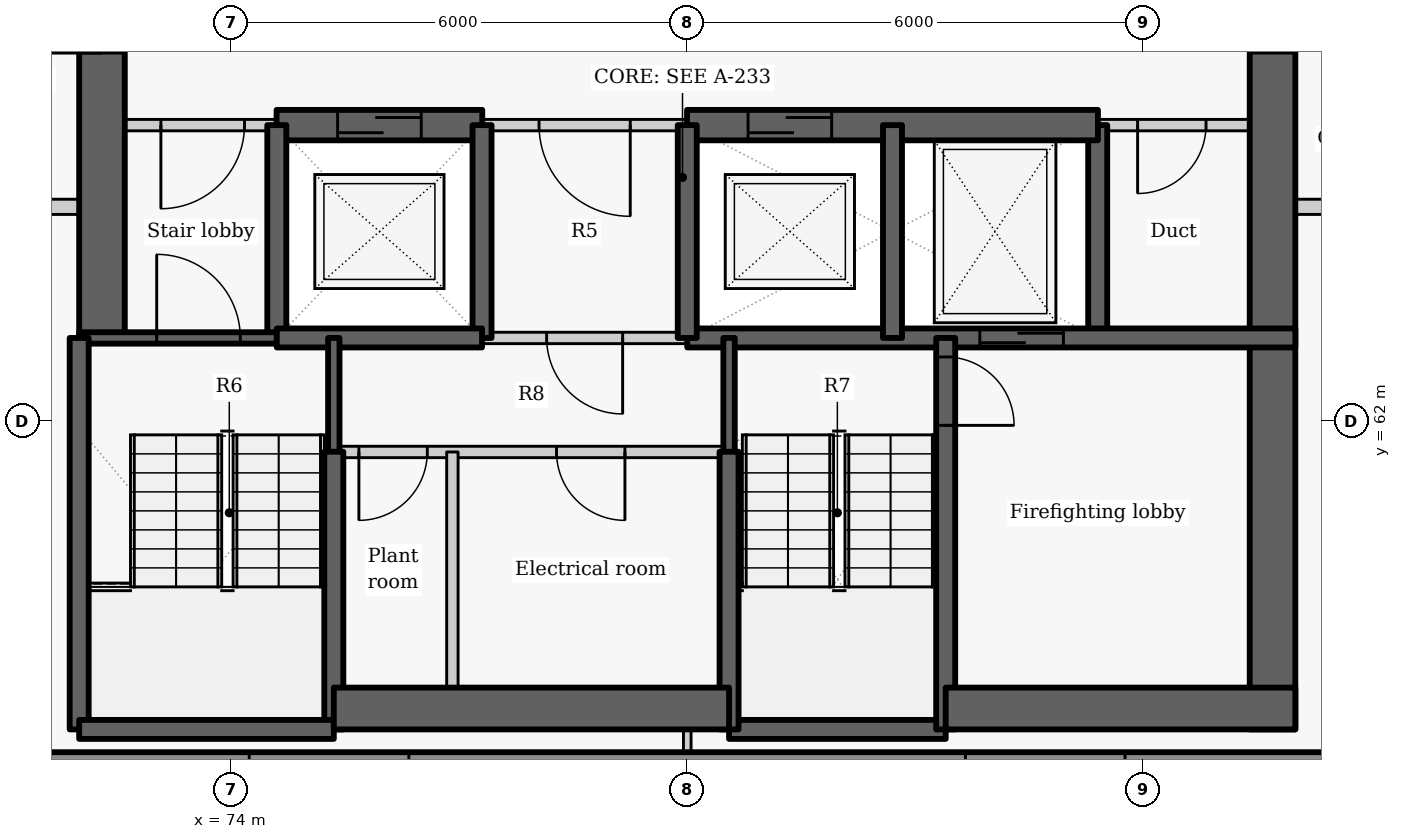
"""IFC4 building model, lengths in metres.
Left out: names, types, materials, properties, quantities, classifications, styles, units other than length and angle.
Written with IfcOpenShell. Run it as: python <this file> out.ifc"""

import sys

from ifc_helpers import new_model, si_unit, direction, frame, frame_2d, origin, place, context, subcontext, project, spatial, rectangle, extrude, element, fill, save


model = new_model("IFC4")
c1 = context("Model", 3, precision=1e-05, world=origin(), true_north=direction((0.0, 1.0)))
c2 = subcontext(c1, "Body", "Model", "MODEL_VIEW")
j1 = project(units=[si_unit("LENGTHUNIT", "METRE"), si_unit("PLANEANGLEUNIT", "RADIAN")], contexts=[c1])
p1 = place(None, origin())
s1 = spatial("IfcSite", under=j1, at=p1, CompositionType="ELEMENT")
p2 = place(p1, origin())
s2 = spatial("IfcBuilding", under=s1, at=p2, CompositionType="ELEMENT")
p3 = place(p2, frame((0.0, 0.0, 183.3)))
s3 = spatial("IfcBuildingStorey", under=s2, at=p3, CompositionType="ELEMENT", Elevation=183.3)
p4 = place(p3, frame((70.551, 57.5, 0.0), z_axis=(0.0, 0.0, 1.0), x_axis=(1.0, 0.0, 0.0)))
e1 = element("IfcWall", 1, at=p4, inside=s3, PredefinedType="SOLIDWALL", context=c2, shape_type="SweptSolid", body=[
    extrude(rectangle(XDim=18.893, YDim=0.3, at=frame_2d((9.446, 0.0))), origin(), (0.0, 0.0, 1.0), 2.425),
])
p5 = place(p4, frame((3.687, 0.0, 0.9)))
e2 = element("IfcOpeningElement", 2, at=p5, cuts=e1, PredefinedType="OPENING", context=c2, shape_type="SweptSolid", body=[
    extrude(rectangle(XDim=2.1, YDim=1.1, at=frame_2d((1.05, 0.55))), frame((0.0, 0.16, 0.0), z_axis=(0.0, -1.0, 0.0), x_axis=(1.0, 0.0, 0.0)), (0.0, 0.0, 1.0), 0.32),
])
p6 = place(p4, frame((13.109, 0.0, 0.9)))
e3 = element("IfcOpeningElement", 3, at=p6, cuts=e1, PredefinedType="OPENING", context=c2, shape_type="SweptSolid", body=[
    extrude(rectangle(XDim=2.1, YDim=1.1, at=frame_2d((1.05, 0.55))), frame((0.0, 0.16, 0.0), z_axis=(0.0, -1.0, 0.0), x_axis=(1.0, 0.0, 0.0)), (0.0, 0.0, 1.0), 0.32),
])
p7 = place(p3, frame((72.3, 63.1, -0.275), z_axis=(0.0, 0.0, 1.0), x_axis=(0.0, 1.0, 0.0)))
e4 = element("IfcWall", 4, at=p7, inside=s3, PredefinedType="SHEAR", context=c2, shape_type="SweptSolid", body=[
    extrude(rectangle(XDim=9.1, YDim=0.6, at=frame_2d((4.55, 0.0))), origin(), (0.0, 0.0, 1.0), 3.3),
])
p8 = place(p7, frame((3.748, 0.0, 0.275)))
e5 = element("IfcOpeningElement", 5, at=p8, cuts=e4, PredefinedType="OPENING", context=c2, shape_type="SweptSolid", body=[
    extrude(rectangle(XDim=1.5, YDim=2.1, at=frame_2d((0.75, 1.05))), frame((0.0, 0.31, 0.0), z_axis=(0.0, -1.0, 0.0), x_axis=(1.0, 0.0, 0.0)), (0.0, 0.0, 1.0), 0.62),
])
p9 = place(p3, frame((85.4, 63.1, -0.275), z_axis=(0.0, 0.0, 1.0), x_axis=(0.0, 1.0, 0.0)))
e6 = element("IfcWall", 6, at=p9, inside=s3, PredefinedType="SHEAR", context=c2, shape_type="SweptSolid", body=[
    extrude(rectangle(XDim=2.8, YDim=0.25, at=frame_2d((1.4, 0.0))), origin(), (0.0, 0.0, 1.0), 3.3),
])
p10 = place(p3, frame((87.7, 72.2, -0.275), z_axis=(0.0, 0.0, 1.0), x_axis=(0.0, -1.0, 0.0)))
e7 = element("IfcWall", 7, at=p10, inside=s3, PredefinedType="SHEAR", context=c2, shape_type="SweptSolid", body=[
    extrude(rectangle(XDim=14.25, YDim=0.6, at=frame_2d((7.125, 0.0))), origin(), (0.0, 0.0, 1.0), 3.3),
])
p11 = place(p10, frame((3.852, 0.0, 0.275)))
e8 = element("IfcOpeningElement", 8, at=p11, cuts=e7, PredefinedType="OPENING", context=c2, shape_type="SweptSolid", body=[
    extrude(rectangle(XDim=1.5, YDim=2.1, at=frame_2d((0.75, 1.05))), frame((0.0, 0.31, 0.0), z_axis=(0.0, -1.0, 0.0), x_axis=(1.0, 0.0, 0.0)), (0.0, 0.0, 1.0), 0.62),
])
p12 = place(p3, frame((74.603, 65.9, 0.0), z_axis=(0.0, 0.0, 1.0), x_axis=(-1.0, 0.0, 0.0)))
e9 = element("IfcWall", 9, at=p12, inside=s3, PredefinedType="PARTITIONING", context=c2, shape_type="SweptSolid", body=[
    extrude(rectangle(XDim=2.603, YDim=0.15, at=frame_2d((1.302, 0.0))), origin(), (0.0, 0.0, 1.0), 3.025),
])
p13 = place(p12, frame((0.428, 0.0, 0.0)))
e10 = element("IfcOpeningElement", 10, at=p13, cuts=e9, PredefinedType="OPENING", context=c2, shape_type="SweptSolid", body=[
    extrude(rectangle(XDim=1.1, YDim=2.1, at=frame_2d((0.55, 1.05))), frame((0.0, 0.085, 0.0), z_axis=(0.0, -1.0, 0.0), x_axis=(1.0, 0.0, 0.0)), (0.0, 0.0, 1.0), 0.17),
])
p14 = place(p3, frame((80.003, 65.9, 0.0), z_axis=(0.0, 0.0, 1.0), x_axis=(-1.0, 0.0, 0.0)))
e11 = element("IfcWall", 11, at=p14, inside=s3, PredefinedType="PARTITIONING", context=c2, shape_type="SweptSolid", body=[
    extrude(rectangle(XDim=2.706, YDim=0.15, at=frame_2d((1.353, 0.0))), origin(), (0.0, 0.0, 1.0), 3.025),
])
p15 = place(p14, frame((0.753, 0.0, 0.0)))
e12 = element("IfcOpeningElement", 12, at=p15, cuts=e11, PredefinedType="OPENING", context=c2, shape_type="SweptSolid", body=[
    extrude(rectangle(XDim=1.2, YDim=2.1, at=frame_2d((0.6, 1.05))), frame((0.0, 0.085, 0.0), z_axis=(0.0, -1.0, 0.0), x_axis=(1.0, 0.0, 0.0)), (0.0, 0.0, 1.0), 0.17),
])
p16 = place(p3, frame((88.0, 65.9, 0.0), z_axis=(0.0, 0.0, 1.0), x_axis=(-1.0, 0.0, 0.0)))
e13 = element("IfcWall", 13, at=p16, inside=s3, PredefinedType="PARTITIONING", context=c2, shape_type="SweptSolid", body=[
    extrude(rectangle(XDim=2.603, YDim=0.15, at=frame_2d((1.302, 0.0))), origin(), (0.0, 0.0, 1.0), 3.025),
])
p17 = place(p16, frame((1.175, 0.0, 0.0)))
e14 = element("IfcOpeningElement", 14, at=p17, cuts=e13, PredefinedType="OPENING", context=c2, shape_type="SweptSolid", body=[
    extrude(rectangle(XDim=0.9, YDim=2.1, at=frame_2d((0.45, 1.05))), frame((0.0, 0.085, 0.0), z_axis=(0.0, -1.0, 0.0), x_axis=(1.0, 0.0, 0.0)), (0.0, 0.0, 1.0), 0.17),
])
p18 = place(p3, frame((74.597, 65.9, -0.275), z_axis=(0.0, 0.0, 1.0), x_axis=(1.0, 0.0, 0.0)))
e15 = element("IfcWall", 15, at=p18, inside=s3, PredefinedType="SHEAR", context=c2, shape_type="SweptSolid", body=[
    extrude(rectangle(XDim=2.706, YDim=0.4, at=frame_2d((1.353, 0.0))), origin(), (0.0, 0.0, 1.0), 3.3),
])
p19 = place(p18, frame((0.803, 0.0, 0.275)))
e16 = element("IfcOpeningElement", 16, at=p19, cuts=e15, PredefinedType="OPENING", context=c2, shape_type="SweptSolid", body=[
    extrude(rectangle(XDim=1.1, YDim=2.1, at=frame_2d((0.55, 1.05))), frame((0.0, 0.21, 0.0), z_axis=(0.0, -1.0, 0.0), x_axis=(1.0, 0.0, 0.0)), (0.0, 0.0, 1.0), 0.42),
])
p20 = place(p3, frame((79.997, 65.9, -0.275), z_axis=(0.0, 0.0, 1.0), x_axis=(1.0, 0.0, 0.0)))
e17 = element("IfcWall", 17, at=p20, inside=s3, PredefinedType="SHEAR", context=c2, shape_type="SweptSolid", body=[
    extrude(rectangle(XDim=5.406, YDim=0.4, at=frame_2d((2.703, 0.0))), origin(), (0.0, 0.0, 1.0), 3.3),
])
p21 = place(p20, frame((0.803, 0.0, 0.275)))
e18 = element("IfcOpeningElement", 18, at=p21, cuts=e17, PredefinedType="OPENING", context=c2, shape_type="SweptSolid", body=[
    extrude(rectangle(XDim=1.1, YDim=2.1, at=frame_2d((0.55, 1.05))), frame((0.0, 0.21, 0.0), z_axis=(0.0, -1.0, 0.0), x_axis=(1.0, 0.0, 0.0)), (0.0, 0.0, 1.0), 0.42),
])
p22 = place(p3, frame((74.6, 63.1, -0.275), z_axis=(0.0, 0.0, 1.0), x_axis=(0.0, 1.0, 0.0)))
e19 = element("IfcWall", 19, at=p22, inside=s3, PredefinedType="SHEAR", context=c2, shape_type="SweptSolid", body=[
    extrude(rectangle(XDim=2.8, YDim=0.25, at=frame_2d((1.4, 0.0))), origin(), (0.0, 0.0, 1.0), 3.3),
])
p23 = place(p3, frame((72.0, 63.1, -0.275), z_axis=(0.0, 0.0, 1.0), x_axis=(1.0, 0.0, 0.0)))
e20 = element("IfcWall", 20, at=p23, inside=s3, PredefinedType="SHEAR", context=c2, shape_type="SweptSolid", body=[
    extrude(rectangle(XDim=2.6, YDim=0.15, at=frame_2d((1.3, 0.0))), origin(), (0.0, 0.0, 1.0), 3.3),
])
p24 = place(p23, frame((1.02, 0.0, 0.275)))
e21 = element("IfcOpeningElement", 21, at=p24, cuts=e20, PredefinedType="OPENING", context=c2, shape_type="SweptSolid", body=[
    extrude(rectangle(XDim=1.1, YDim=2.1, at=frame_2d((0.55, 1.05))), frame((0.0, 0.085, 0.0), z_axis=(0.0, -1.0, 0.0), x_axis=(1.0, 0.0, 0.0)), (0.0, 0.0, 1.0), 0.17),
])
p25 = place(p3, frame((77.3, 63.1, -0.275), z_axis=(0.0, 0.0, 1.0), x_axis=(0.0, 1.0, 0.0)))
e22 = element("IfcWall", 22, at=p25, inside=s3, PredefinedType="SHEAR", context=c2, shape_type="SweptSolid", body=[
    extrude(rectangle(XDim=2.8, YDim=0.25, at=frame_2d((1.4, 0.0))), origin(), (0.0, 0.0, 1.0), 3.3),
])
p26 = place(p3, frame((74.6, 63.1, -0.275), z_axis=(0.0, 0.0, 1.0), x_axis=(1.0, 0.0, 0.0)))
e23 = element("IfcWall", 23, at=p26, inside=s3, PredefinedType="SHEAR", context=c2, shape_type="SweptSolid", body=[
    extrude(rectangle(XDim=2.7, YDim=0.25, at=frame_2d((1.35, 0.0))), origin(), (0.0, 0.0, 1.0), 3.3),
])
p27 = place(p3, frame((80.0, 63.1, -0.275), z_axis=(0.0, 0.0, 1.0), x_axis=(1.0, 0.0, 0.0)))
e24 = element("IfcWall", 24, at=p27, inside=s3, PredefinedType="SHEAR", context=c2, shape_type="SweptSolid", body=[
    extrude(rectangle(XDim=8.0, YDim=0.25, at=frame_2d((4.0, 0.0))), origin(), (0.0, 0.0, 1.0), 3.3),
])
p28 = place(p27, frame((3.849, 0.0, 0.275)))
e25 = element("IfcOpeningElement", 25, at=p28, cuts=e24, PredefinedType="OPENING", context=c2, shape_type="SweptSolid", body=[
    extrude(rectangle(XDim=1.1, YDim=2.1, at=frame_2d((0.55, 1.05))), frame((0.0, 0.135, 0.0), z_axis=(0.0, -1.0, 0.0), x_axis=(1.0, 0.0, 0.0)), (0.0, 0.0, 1.0), 0.27),
])
p29 = place(p3, frame((80.0, 63.1, -0.275), z_axis=(0.0, 0.0, 1.0), x_axis=(0.0, 1.0, 0.0)))
e26 = element("IfcWall", 26, at=p29, inside=s3, PredefinedType="SHEAR", context=c2, shape_type="SweptSolid", body=[
    extrude(rectangle(XDim=2.8, YDim=0.25, at=frame_2d((1.4, 0.0))), origin(), (0.0, 0.0, 1.0), 3.3),
])
p30 = place(p3, frame((80.0, 63.1, 0.0), z_axis=(0.0, 0.0, 1.0), x_axis=(-1.0, 0.0, 0.0)))
e27 = element("IfcWall", 27, at=p30, inside=s3, PredefinedType="PARTITIONING", context=c2, shape_type="SweptSolid", body=[
    extrude(rectangle(XDim=2.7, YDim=0.15, at=frame_2d((1.35, 0.0))), origin(), (0.0, 0.0, 1.0), 3.025),
])
p31 = place(p30, frame((0.85, 0.0, 0.0)))
e28 = element("IfcOpeningElement", 28, at=p31, cuts=e27, PredefinedType="OPENING", context=c2, shape_type="SweptSolid", body=[
    extrude(rectangle(XDim=1.0, YDim=2.1, at=frame_2d((0.5, 1.05))), frame((0.0, 0.085, 0.0), z_axis=(0.0, -1.0, 0.0), x_axis=(1.0, 0.0, 0.0)), (0.0, 0.0, 1.0), 0.17),
])
p32 = place(p3, frame((82.7, 63.1, -0.275), z_axis=(0.0, 0.0, 1.0), x_axis=(0.0, 1.0, 0.0)))
e29 = element("IfcWall", 29, at=p32, inside=s3, PredefinedType="SHEAR", context=c2, shape_type="SweptSolid", body=[
    extrude(rectangle(XDim=2.8, YDim=0.25, at=frame_2d((1.4, 0.0))), origin(), (0.0, 0.0, 1.0), 3.3),
])
p33 = place(p3, frame((75.35, 61.597, -0.275), z_axis=(0.0, 0.0, 1.0), x_axis=(0.0, 1.0, 0.0)))
e30 = element("IfcWall", 30, at=p33, inside=s3, PredefinedType="SHEAR", context=c2, shape_type="SweptSolid", body=[
    extrude(rectangle(XDim=1.503, YDim=0.15, at=frame_2d((0.751, 0.0))), origin(), (0.0, 0.0, 1.0), 3.3),
])
p34 = place(p3, frame((75.35, 57.95, -0.275), z_axis=(0.0, 0.0, 1.0), x_axis=(0.0, 1.0, 0.0)))
e31 = element("IfcWall", 31, at=p34, inside=s3, PredefinedType="SHEAR", context=c2, shape_type="SweptSolid", body=[
    extrude(rectangle(XDim=3.653, YDim=0.25, at=frame_2d((1.827, 0.0))), origin(), (0.0, 0.0, 1.0), 3.3),
])
p35 = place(p3, frame((72.0, 57.95, -0.275), z_axis=(0.0, 0.0, 1.0), x_axis=(0.0, 1.0, 0.0)))
e32 = element("IfcWall", 32, at=p35, inside=s3, PredefinedType="SHEAR", context=c2, shape_type="SweptSolid", body=[
    extrude(rectangle(XDim=5.15, YDim=0.25, at=frame_2d((2.575, 0.0))), origin(), (0.0, 0.0, 1.0), 3.3),
])
p36 = place(p3, frame((72.0, 57.95, -0.275), z_axis=(0.0, 0.0, 1.0), x_axis=(1.0, 0.0, 0.0)))
e33 = element("IfcWall", 33, at=p36, inside=s3, PredefinedType="SHEAR", context=c2, shape_type="SweptSolid", body=[
    extrude(rectangle(XDim=3.35, YDim=0.25, at=frame_2d((1.675, 0.0))), origin(), (0.0, 0.0, 1.0), 3.3),
])
p37 = place(p3, frame((80.55, 57.95, -0.275), z_axis=(0.0, 0.0, 1.0), x_axis=(1.0, 0.0, 0.0)))
e34 = element("IfcWall", 34, at=p37, inside=s3, PredefinedType="SHEAR", context=c2, shape_type="SweptSolid", body=[
    extrude(rectangle(XDim=2.85, YDim=0.25, at=frame_2d((1.425, 0.0))), origin(), (0.0, 0.0, 1.0), 3.3),
])
p38 = place(p3, frame((83.4, 63.1, -0.275), z_axis=(0.0, 0.0, 1.0), x_axis=(0.0, -1.0, 0.0)))
e35 = element("IfcWall", 35, at=p38, inside=s3, PredefinedType="SHEAR", context=c2, shape_type="SweptSolid", body=[
    extrude(rectangle(XDim=5.15, YDim=0.25, at=frame_2d((2.575, 0.0))), origin(), (0.0, 0.0, 1.0), 3.3),
])
p39 = place(p38, frame((0.25, 0.0, 0.275)))
e36 = element("IfcOpeningElement", 36, at=p39, cuts=e35, PredefinedType="OPENING", context=c2, shape_type="SweptSolid", body=[
    extrude(rectangle(XDim=0.9, YDim=2.1, at=frame_2d((0.45, 1.05))), frame((0.0, 0.135, 0.0), z_axis=(0.0, -1.0, 0.0), x_axis=(1.0, 0.0, 0.0)), (0.0, 0.0, 1.0), 0.27),
])
p40 = place(p3, frame((80.55, 61.597, -0.275), z_axis=(0.0, 0.0, 1.0), x_axis=(0.0, 1.0, 0.0)))
e37 = element("IfcWall", 37, at=p40, inside=s3, PredefinedType="SHEAR", context=c2, shape_type="SweptSolid", body=[
    extrude(rectangle(XDim=1.503, YDim=0.15, at=frame_2d((0.751, 0.0))), origin(), (0.0, 0.0, 1.0), 3.3),
])
p41 = place(p3, frame((80.55, 57.95, -0.275), z_axis=(0.0, 0.0, 1.0), x_axis=(0.0, 1.0, 0.0)))
e38 = element("IfcWall", 38, at=p41, inside=s3, PredefinedType="SHEAR", context=c2, shape_type="SweptSolid", body=[
    extrude(rectangle(XDim=3.653, YDim=0.25, at=frame_2d((1.827, 0.0))), origin(), (0.0, 0.0, 1.0), 3.3),
])
p42 = place(p3, frame((75.35, 58.225, -0.275), z_axis=(0.0, 0.0, 1.0), x_axis=(1.0, 0.0, 0.0)))
e39 = element("IfcWall", 39, at=p42, inside=s3, PredefinedType="SHEAR", context=c2, shape_type="SweptSolid", body=[
    extrude(rectangle(XDim=5.2, YDim=0.55, at=frame_2d((2.6, 0.0))), origin(), (0.0, 0.0, 1.0), 3.3),
])
p43 = place(p3, frame((83.4, 58.225, -0.275), z_axis=(0.0, 0.0, 1.0), x_axis=(1.0, 0.0, 0.0)))
e40 = element("IfcWall", 40, at=p43, inside=s3, PredefinedType="SHEAR", context=c2, shape_type="SweptSolid", body=[
    extrude(rectangle(XDim=4.6, YDim=0.55, at=frame_2d((2.3, 0.0))), origin(), (0.0, 0.0, 1.0), 3.3),
])
p44 = place(p3, frame((80.55, 61.6, 0.0), z_axis=(0.0, 0.0, 1.0), x_axis=(-1.0, 0.0, 0.0)))
e41 = element("IfcWall", 41, at=p44, inside=s3, PredefinedType="PARTITIONING", context=c2, shape_type="SweptSolid", body=[
    extrude(rectangle(XDim=5.2, YDim=0.15, at=frame_2d((2.6, 0.0))), origin(), (0.0, 0.0, 1.0), 3.025),
])
p45 = place(p44, frame((3.97, 0.0, 0.0)))
e42 = element("IfcOpeningElement", 42, at=p45, cuts=e41, PredefinedType="OPENING", context=c2, shape_type="SweptSolid", body=[
    extrude(rectangle(XDim=0.9, YDim=2.1, at=frame_2d((0.45, 1.05))), frame((0.0, 0.085, 0.0), z_axis=(0.0, -1.0, 0.0), x_axis=(1.0, 0.0, 0.0)), (0.0, 0.0, 1.0), 0.17),
])
p46 = place(p44, frame((1.37, 0.0, 0.0)))
e43 = element("IfcOpeningElement", 43, at=p46, cuts=e41, PredefinedType="OPENING", context=c2, shape_type="SweptSolid", body=[
    extrude(rectangle(XDim=0.9, YDim=2.1, at=frame_2d((0.45, 1.05))), frame((0.0, 0.085, 0.0), z_axis=(0.0, -1.0, 0.0), x_axis=(1.0, 0.0, 0.0)), (0.0, 0.0, 1.0), 0.17),
])
p47 = place(p3, frame((76.91, 57.95, 0.0), z_axis=(0.0, 0.0, 1.0), x_axis=(0.0, 1.0, 0.0)))
e44 = element("IfcWall", 44, at=p47, inside=s3, PredefinedType="PARTITIONING", context=c2, shape_type="SweptSolid", body=[
    extrude(rectangle(XDim=3.65, YDim=0.15, at=frame_2d((1.825, 0.0))), origin(), (0.0, 0.0, 1.0), 3.025),
])
p48 = place(p3, frame((70.527, 64.825, 0.0), z_axis=(0.0, 0.0, 1.0), x_axis=(1.0, 0.0, 0.0)))
e45 = element("IfcWall", 45, at=p48, inside=s3, PredefinedType="PARTITIONING", context=c2, shape_type="SweptSolid", body=[
    extrude(rectangle(XDim=1.473, YDim=0.2, at=frame_2d((0.736, 0.0))), origin(), (0.0, 0.0, 1.0), 3.025),
])
p49 = place(p3, frame((88.0, 64.825, 0.0), z_axis=(0.0, 0.0, 1.0), x_axis=(1.0, 0.0, 0.0)))
e46 = element("IfcWall", 46, at=p49, inside=s3, PredefinedType="PARTITIONING", context=c2, shape_type="SweptSolid", body=[
    extrude(rectangle(XDim=2.413, YDim=0.2, at=frame_2d((1.207, 0.0))), origin(), (0.0, 0.0, 1.0), 2.505),
])
p50 = place(p3, frame((80.0, 57.65, 0.0), z_axis=(0.0, 0.0, 1.0), x_axis=(0.0, 1.0, 0.0)))
e47 = element("IfcWall", 47, at=p50, inside=s3, PredefinedType="PARTITIONING", context=c2, shape_type="SweptSolid", body=[
    extrude(rectangle(XDim=0.3, YDim=0.1, at=frame_2d((0.15, 0.0))), origin(), (0.0, 0.0, 1.0), 3.025),
])
p51 = place(p13, origin())
e48 = element("IfcDoor", 48, at=p51, inside=s3, OperationType="SINGLE_SWING_RIGHT", PredefinedType="DOOR", context=c2, shape_type="SweptSolid", body=[
    extrude(rectangle(XDim=1.1, YDim=2.1, at=frame_2d((0.55, 1.05))), frame((0.0, 0.025, 0.0), z_axis=(0.0, -1.0, 0.0), x_axis=(1.0, 0.0, 0.0)), (0.0, 0.0, 1.0), 0.05),
])
fill(e10, e48)
p52 = place(p19, origin())
e49 = element("IfcDoor", 49, at=p52, inside=s3, OperationType="SLIDING_TO_LEFT", PredefinedType="DOOR", context=c2, shape_type="SweptSolid", body=[
    extrude(rectangle(XDim=1.1, YDim=2.1, at=frame_2d((0.55, 1.05))), frame((0.0, 0.025, 0.0), z_axis=(0.0, -1.0, 0.0), x_axis=(1.0, 0.0, 0.0)), (0.0, 0.0, 1.0), 0.05),
])
fill(e16, e49)
p53 = place(p15, origin())
e50 = element("IfcDoor", 50, at=p53, inside=s3, OperationType="DOUBLE_DOOR_SINGLE_SWING", PredefinedType="DOOR", context=c2, shape_type="SweptSolid", body=[
    extrude(rectangle(XDim=1.2, YDim=2.1, at=frame_2d((0.6, 1.05))), frame((0.0, 0.025, 0.0), z_axis=(0.0, -1.0, 0.0), x_axis=(1.0, 0.0, 0.0)), (0.0, 0.0, 1.0), 0.05),
])
fill(e12, e50)
p54 = place(p21, origin())
e51 = element("IfcDoor", 51, at=p54, inside=s3, OperationType="SLIDING_TO_LEFT", PredefinedType="DOOR", context=c2, shape_type="SweptSolid", body=[
    extrude(rectangle(XDim=1.1, YDim=2.1, at=frame_2d((0.55, 1.05))), frame((0.0, 0.025, 0.0), z_axis=(0.0, -1.0, 0.0), x_axis=(1.0, 0.0, 0.0)), (0.0, 0.0, 1.0), 0.05),
])
fill(e18, e51)
p55 = place(p28, origin())
e52 = element("IfcDoor", 52, at=p55, inside=s3, OperationType="SLIDING_TO_LEFT", PredefinedType="DOOR", context=c2, shape_type="SweptSolid", body=[
    extrude(rectangle(XDim=1.1, YDim=2.1, at=frame_2d((0.55, 1.05))), frame((0.0, 0.025, 0.0), z_axis=(0.0, -1.0, 0.0), x_axis=(1.0, 0.0, 0.0)), (0.0, 0.0, 1.0), 0.05),
])
fill(e25, e52)
p56 = place(p17, origin())
e53 = element("IfcDoor", 53, at=p56, inside=s3, OperationType="SINGLE_SWING_RIGHT", PredefinedType="DOOR", context=c2, shape_type="SweptSolid", body=[
    extrude(rectangle(XDim=0.9, YDim=2.1, at=frame_2d((0.45, 1.05))), frame((0.0, 0.025, 0.0), z_axis=(0.0, -1.0, 0.0), x_axis=(1.0, 0.0, 0.0)), (0.0, 0.0, 1.0), 0.05),
])
fill(e14, e53)
p57 = place(p31, origin())
e54 = element("IfcDoor", 54, at=p57, inside=s3, OperationType="SINGLE_SWING_LEFT", PredefinedType="DOOR", context=c2, shape_type="SweptSolid", body=[
    extrude(rectangle(XDim=1.0, YDim=2.1, at=frame_2d((0.5, 1.05))), frame((0.0, 0.025, 0.0), z_axis=(0.0, -1.0, 0.0), x_axis=(1.0, 0.0, 0.0)), (0.0, 0.0, 1.0), 0.05),
])
fill(e28, e54)
p58 = place(p45, origin())
e55 = element("IfcDoor", 55, at=p58, inside=s3, OperationType="SINGLE_SWING_RIGHT", PredefinedType="DOOR", context=c2, shape_type="SweptSolid", body=[
    extrude(rectangle(XDim=0.9, YDim=2.1, at=frame_2d((0.45, 1.05))), frame((0.0, 0.025, 0.0), z_axis=(0.0, -1.0, 0.0), x_axis=(1.0, 0.0, 0.0)), (0.0, 0.0, 1.0), 0.05),
])
fill(e42, e55)
p59 = place(p46, origin())
e56 = element("IfcDoor", 56, at=p59, inside=s3, OperationType="SINGLE_SWING_LEFT", PredefinedType="DOOR", context=c2, shape_type="SweptSolid", body=[
    extrude(rectangle(XDim=0.9, YDim=2.1, at=frame_2d((0.45, 1.05))), frame((0.0, 0.025, 0.0), z_axis=(0.0, -1.0, 0.0), x_axis=(1.0, 0.0, 0.0)), (0.0, 0.0, 1.0), 0.05),
])
fill(e43, e56)
p60 = place(p24, origin())
e57 = element("IfcDoor", 57, at=p60, inside=s3, OperationType="SINGLE_SWING_LEFT", PredefinedType="DOOR", context=c2, shape_type="SweptSolid", body=[
    extrude(rectangle(XDim=1.1, YDim=2.1, at=frame_2d((0.55, 1.05))), frame((0.0, 0.025, 0.0), z_axis=(0.0, -1.0, 0.0), x_axis=(1.0, 0.0, 0.0)), (0.0, 0.0, 1.0), 0.05),
])
fill(e21, e57)
p61 = place(p39, origin())
e58 = element("IfcDoor", 58, at=p61, inside=s3, OperationType="SINGLE_SWING_RIGHT", PredefinedType="DOOR", context=c2, shape_type="SweptSolid", body=[
    extrude(rectangle(XDim=0.9, YDim=2.1, at=frame_2d((0.45, 1.05))), frame((0.0, 0.025, 0.0), z_axis=(0.0, -1.0, 0.0), x_axis=(1.0, 0.0, 0.0)), (0.0, 0.0, 1.0), 0.05),
])
fill(e36, e58)
p62 = place(p11, origin())
e59 = element("IfcDoor", 59, at=p62, inside=s3, OperationType="DOUBLE_DOOR_SINGLE_SWING", PredefinedType="DOOR", context=c2, shape_type="SweptSolid", body=[
    extrude(rectangle(XDim=1.5, YDim=2.1, at=frame_2d((0.75, 1.05))), frame((0.0, 0.025, 0.0), z_axis=(0.0, -1.0, 0.0), x_axis=(1.0, 0.0, 0.0)), (0.0, 0.0, 1.0), 0.05),
])
fill(e8, e59)
p63 = place(p8, origin())
e60 = element("IfcDoor", 60, at=p63, inside=s3, OperationType="DOUBLE_DOOR_SINGLE_SWING", PredefinedType="DOOR", context=c2, shape_type="SweptSolid", body=[
    extrude(rectangle(XDim=1.5, YDim=2.1, at=frame_2d((0.75, 1.05))), frame((0.0, 0.025, 0.0), z_axis=(0.0, -1.0, 0.0), x_axis=(1.0, 0.0, 0.0)), (0.0, 0.0, 1.0), 0.05),
])
fill(e5, e60)
save(model, sys.argv[1])
